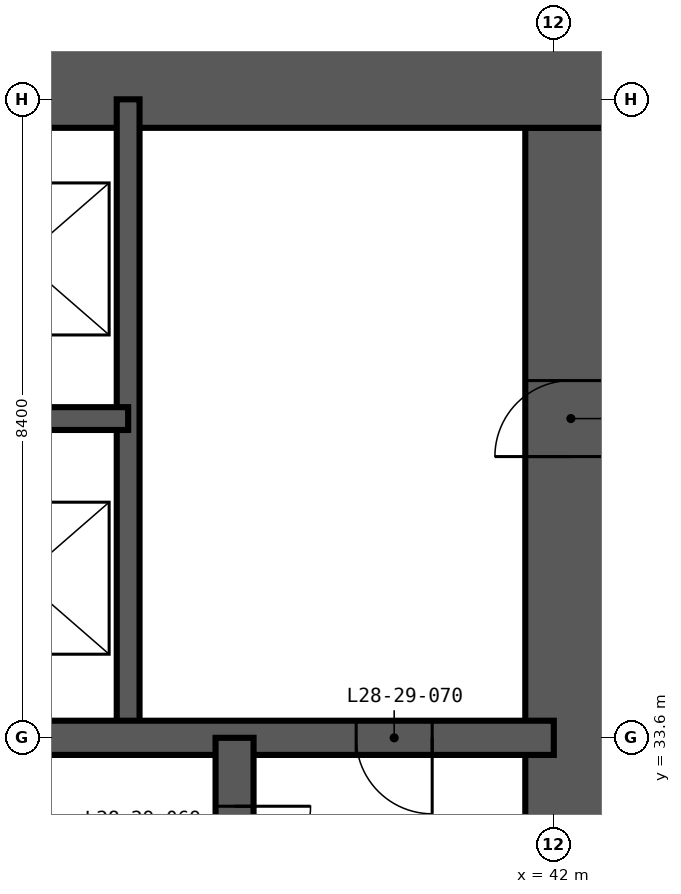
"""IFC4 building model, lengths in metres.
Left out: names, types, materials, properties, quantities, classifications, styles, units other than length and angle.
Written with IfcOpenShell. Run it as: python <this file> out.ifc"""

import sys

from ifc_helpers import new_model, si_unit, direction, frame, frame_2d, origin, place, context, subcontext, project, spatial, rectangle, extrude, element, fill, save


model = new_model("IFC4")
c1 = context("Model", 3, precision=1e-05, world=origin(), true_north=direction((0.0, 1.0)))
c2 = subcontext(c1, "Body", "Model", "MODEL_VIEW")
j1 = project(units=[si_unit("LENGTHUNIT", "METRE"), si_unit("PLANEANGLEUNIT", "RADIAN")], contexts=[c1])
p1 = place(None, origin())
s1 = spatial("IfcSite", under=j1, at=p1, CompositionType="ELEMENT")
p2 = place(p1, origin())
s2 = spatial("IfcBuilding", under=s1, at=p2, CompositionType="ELEMENT")
p3 = place(p2, frame((0.0, 0.0, 111.6)))
s3 = spatial("IfcBuildingStorey", under=s2, at=p3, CompositionType="ELEMENT", Elevation=111.6)
p4 = place(p3, frame((42.225, 17.175, -0.35), z_axis=(0.0, 0.0, 1.0), x_axis=(0.0, 1.0, 0.0)))
e1 = element("IfcWall", 1, at=p4, inside=s3, PredefinedType="SHEAR", context=c2, shape_type="SweptSolid", body=[
    extrude(rectangle(XDim=24.45, YDim=1.2, at=frame_2d((12.225, 0.0))), origin(), (0.0, 0.0, 1.0), 3.6),
])
p5 = place(p4, frame((0.425, 0.0, 0.35)))
e2 = element("IfcOpeningElement", 2, at=p5, cuts=e1, PredefinedType="OPENING", context=c2, shape_type="SweptSolid", body=[
    extrude(rectangle(XDim=1.2, YDim=2.2, at=frame_2d((0.6, 1.1))), frame((0.0, 0.61, 0.0), z_axis=(0.0, -1.0, 0.0), x_axis=(1.0, 0.0, 0.0)), (0.0, 0.0, 1.0), 1.22),
])
p6 = place(p4, frame((11.325, 0.0, 0.35)))
e3 = element("IfcOpeningElement", 3, at=p6, cuts=e1, PredefinedType="OPENING", context=c2, shape_type="SweptSolid", body=[
    extrude(rectangle(XDim=1.8, YDim=2.2, at=frame_2d((0.9, 1.1))), frame((0.0, 0.61, 0.0), z_axis=(0.0, -1.0, 0.0), x_axis=(1.0, 0.0, 0.0)), (0.0, 0.0, 1.0), 1.22),
])
p7 = place(p4, frame((20.125, 0.0, 0.35)))
e4 = element("IfcOpeningElement", 4, at=p7, cuts=e1, PredefinedType="OPENING", context=c2, shape_type="SweptSolid", body=[
    extrude(rectangle(XDim=1.0, YDim=2.1, at=frame_2d((0.5, 1.05))), frame((0.0, 0.61, 0.0), z_axis=(0.0, -1.0, 0.0), x_axis=(1.0, 0.0, 0.0)), (0.0, 0.0, 1.0), 1.22),
])
p8 = place(p3, frame((42.825, 42.225, -0.35), z_axis=(0.0, 0.0, 1.0), x_axis=(-1.0, 0.0, 0.0)))
e5 = element("IfcWall", 5, at=p8, inside=s3, PredefinedType="SHEAR", context=c2, shape_type="SweptSolid", body=[
    extrude(rectangle(XDim=26.85, YDim=1.2, at=frame_2d((13.425, 0.0))), origin(), (0.0, 0.0, 1.0), 3.6),
])
p9 = place(p8, frame((21.325, 0.0, 0.35)))
e6 = element("IfcOpeningElement", 6, at=p9, cuts=e5, PredefinedType="OPENING", context=c2, shape_type="SweptSolid", body=[
    extrude(rectangle(XDim=1.0, YDim=2.1, at=frame_2d((0.5, 1.05))), frame((0.0, 0.61, 0.0), z_axis=(0.0, -1.0, 0.0), x_axis=(1.0, 0.0, 0.0)), (0.0, 0.0, 1.0), 1.22),
])
p10 = place(p8, frame((10.725, 0.0, 0.35)))
e7 = element("IfcOpeningElement", 7, at=p10, cuts=e5, PredefinedType="OPENING", context=c2, shape_type="SweptSolid", body=[
    extrude(rectangle(XDim=1.2, YDim=2.2, at=frame_2d((0.6, 1.1))), frame((0.0, 0.61, 0.0), z_axis=(0.0, -1.0, 0.0), x_axis=(1.0, 0.0, 0.0)), (0.0, 0.0, 1.0), 1.22),
])
p11 = place(p3, frame((36.4, 33.6, -0.35), z_axis=(0.0, 0.0, 1.0), x_axis=(0.0, 1.0, 0.0)))
e8 = element("IfcWall", 8, at=p11, inside=s3, PredefinedType="SHEAR", context=c2, shape_type="SweptSolid", body=[
    extrude(rectangle(XDim=8.4, YDim=0.3, at=frame_2d((4.2, 0.0))), origin(), (0.0, 0.0, 1.0), 3.6),
])
p12 = place(p3, frame((33.6, 37.8, -0.35), z_axis=(0.0, 0.0, 1.0), x_axis=(1.0, 0.0, 0.0)))
e9 = element("IfcWall", 9, at=p12, inside=s3, PredefinedType="SHEAR", context=c2, shape_type="SweptSolid", body=[
    extrude(rectangle(XDim=2.8, YDim=0.3, at=frame_2d((1.4, 0.0))), origin(), (0.0, 0.0, 1.0), 3.6),
])
p13 = place(p3, frame((16.8, 33.6, -0.35), z_axis=(0.0, 0.0, 1.0), x_axis=(1.0, 0.0, 0.0)))
e10 = element("IfcWall", 10, at=p13, inside=s3, PredefinedType="SHEAR", context=c2, shape_type="SweptSolid", body=[
    extrude(rectangle(XDim=25.2, YDim=0.45, at=frame_2d((12.6, 0.0))), origin(), (0.0, 0.0, 1.0), 3.6),
])
p14 = place(p13, frame((22.6, 0.0, 0.35)))
e11 = element("IfcOpeningElement", 11, at=p14, cuts=e10, PredefinedType="OPENING", context=c2, shape_type="SweptSolid", body=[
    extrude(rectangle(XDim=1.0, YDim=2.1, at=frame_2d((0.5, 1.05))), frame((0.0, 0.235, 0.0), z_axis=(0.0, -1.0, 0.0), x_axis=(1.0, 0.0, 0.0)), (0.0, 0.0, 1.0), 0.47),
])
p15 = place(p3, frame((37.8, 30.8, -0.35), z_axis=(0.0, 0.0, 1.0), x_axis=(0.0, 1.0, 0.0)))
e12 = element("IfcWall", 12, at=p15, inside=s3, PredefinedType="SHEAR", context=c2, shape_type="SweptSolid", body=[
    extrude(rectangle(XDim=2.8, YDim=0.5, at=frame_2d((1.4, 0.0))), origin(), (0.0, 0.0, 1.0), 3.6),
])
p16 = place(p15, frame((0.9, 0.0, 0.35)))
e13 = element("IfcOpeningElement", 13, at=p16, cuts=e12, PredefinedType="OPENING", context=c2, shape_type="SweptSolid", body=[
    extrude(rectangle(XDim=1.0, YDim=2.1, at=frame_2d((0.5, 1.05))), frame((0.0, 0.26, 0.0), z_axis=(0.0, -1.0, 0.0), x_axis=(1.0, 0.0, 0.0)), (0.0, 0.0, 1.0), 0.52),
])
p17 = place(p16, frame((1.0, 0.0, 0.0), z_axis=(0.0, 0.0, 1.0), x_axis=(-1.0, 0.0, 0.0)))
e14 = element("IfcDoor", 14, at=p17, inside=s3, OperationType="SINGLE_SWING_LEFT", PredefinedType="DOOR", context=c2, shape_type="SweptSolid", body=[
    extrude(rectangle(XDim=1.0, YDim=2.1, at=frame_2d((0.5, 1.05))), frame((0.0, 0.025, 0.0), z_axis=(0.0, -1.0, 0.0), x_axis=(1.0, 0.0, 0.0)), (0.0, 0.0, 1.0), 0.05),
])
fill(e13, e14)
p18 = place(p14, frame((1.0, 0.0, 0.0), z_axis=(0.0, 0.0, 1.0), x_axis=(-1.0, 0.0, 0.0)))
e15 = element("IfcDoor", 15, at=p18, inside=s3, OperationType="SINGLE_SWING_LEFT", PredefinedType="DOOR", context=c2, shape_type="SweptSolid", body=[
    extrude(rectangle(XDim=1.0, YDim=2.1, at=frame_2d((0.5, 1.05))), frame((0.0, 0.025, 0.0), z_axis=(0.0, -1.0, 0.0), x_axis=(1.0, 0.0, 0.0)), (0.0, 0.0, 1.0), 0.05),
])
fill(e11, e15)
p19 = place(p7, origin())
e16 = element("IfcDoor", 16, at=p19, inside=s3, OperationType="SINGLE_SWING_LEFT", PredefinedType="DOOR", context=c2, shape_type="SweptSolid", body=[
    extrude(rectangle(XDim=1.0, YDim=2.1, at=frame_2d((0.5, 1.05))), frame((0.0, 0.025, 0.0), z_axis=(0.0, -1.0, 0.0), x_axis=(1.0, 0.0, 0.0)), (0.0, 0.0, 1.0), 0.05),
])
fill(e4, e16)
save(model, sys.argv[1])
